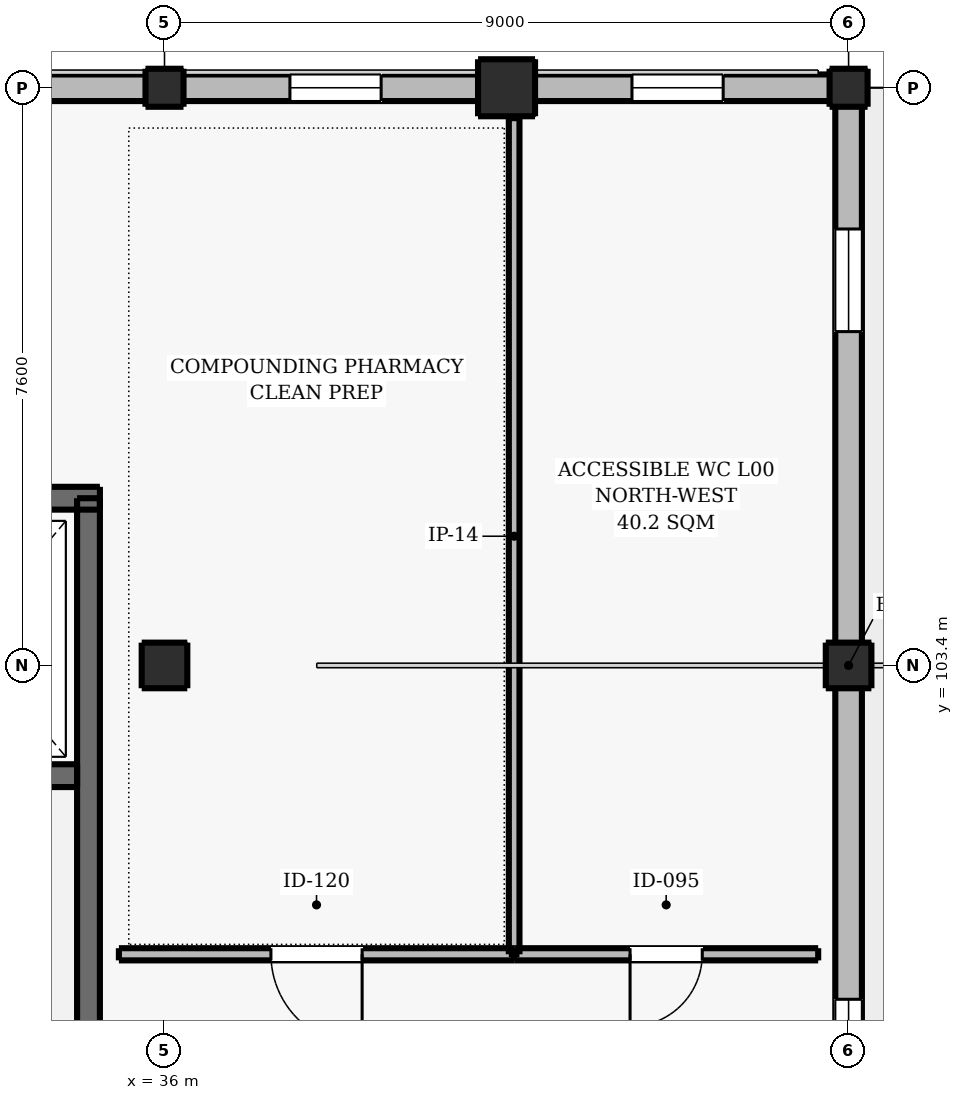
"""IFC4 building model, lengths in metres.
Left out: names, types, materials, properties, quantities, classifications, styles, units other than length and angle.
Written with IfcOpenShell. Run it as: python <this file> out.ifc"""

import sys

from ifc_helpers import new_model, si_unit, direction, frame, frame_2d, origin, origin_2d, place, context, subcontext, project, spatial, rectangle, circle, extrude, element, fill, save


model = new_model("IFC4")
c1 = context("Model", 3, precision=1e-05, world=origin(), true_north=direction((0.0, 1.0)))
c2 = subcontext(c1, "Body", "Model", "MODEL_VIEW")
j1 = project(units=[si_unit("LENGTHUNIT", "METRE"), si_unit("PLANEANGLEUNIT", "RADIAN")], contexts=[c1])
p1 = place(None, origin())
s1 = spatial("IfcSite", under=j1, at=p1, CompositionType="ELEMENT")
p2 = place(p1, origin())
s2 = spatial("IfcBuilding", under=s1, at=p2, CompositionType="ELEMENT")
p3 = place(p2, origin())
s3 = spatial("IfcBuildingStorey", under=s2, at=p3, CompositionType="ELEMENT", Elevation=0.0)
p4 = place(p3, frame((36.0, 103.4, 0.0), z_axis=(0.0, 0.0, 1.0), x_axis=(1.0, 0.0, 0.0)))
e1 = element("IfcColumn", 1, at=p4, inside=s3, PredefinedType="COLUMN", context=c2, shape_type="SweptSolid", body=[
    extrude(rectangle(XDim=0.6, YDim=0.6, at=origin_2d()), origin(), (0.0, 0.0, 1.0), 5.1),
])
p5 = place(p3, frame((36.0, 111.0, 0.0), z_axis=(0.0, 0.0, 1.0), x_axis=(1.0, 0.0, 0.0)))
e2 = element("IfcColumn", 2, at=p5, inside=s3, PredefinedType="COLUMN", context=c2, shape_type="SweptSolid", body=[
    extrude(circle(Radius=0.35, at=origin_2d()), origin(), (0.0, 0.0, 1.0), 5.1),
])
p6 = place(p3, frame((40.5, 111.0, 0.0), z_axis=(0.0, 0.0, 1.0), x_axis=(1.0, 0.0, 0.0)))
e3 = element("IfcColumn", 3, at=p6, inside=s3, PredefinedType="PILASTER", context=c2, shape_type="SweptSolid", body=[
    extrude(rectangle(XDim=0.75, YDim=0.75, at=origin_2d()), origin(), (0.0, 0.0, 1.0), 5.1),
])
p7 = place(p3, frame((45.0, 103.4, 0.0), z_axis=(0.0, 0.0, 1.0), x_axis=(1.0, 0.0, 0.0)))
e4 = element("IfcColumn", 4, at=p7, inside=s3, PredefinedType="COLUMN", context=c2, shape_type="SweptSolid", body=[
    extrude(rectangle(XDim=0.6, YDim=0.6, at=origin_2d()), origin(), (0.0, 0.0, 1.0), 5.1),
])
p8 = place(p3, frame((45.0, 111.0, 0.0), z_axis=(0.0, 0.0, 1.0), x_axis=(1.0, 0.0, 0.0)))
e5 = element("IfcColumn", 5, at=p8, inside=s3, PredefinedType="COLUMN", context=c2, shape_type="SweptSolid", body=[
    extrude(circle(Radius=0.35, at=origin_2d()), origin(), (0.0, 0.0, 1.0), 5.1),
])
p9 = place(p3, frame((27.25, 105.6, 0.0), z_axis=(0.0, 0.0, 1.0), x_axis=(1.0, 0.0, 0.0)))
e6 = element("IfcWall", 6, at=p9, inside=s3, PredefinedType="SHEAR", context=c2, shape_type="SweptSolid", body=[
    extrude(rectangle(XDim=7.9, YDim=0.3, at=frame_2d((3.95, 0.0))), origin(), (0.0, 0.0, 1.0), 5.1),
])
p10 = place(p3, frame((35.0, 98.4, 0.0), z_axis=(0.0, 0.0, 1.0), x_axis=(0.0, 1.0, 0.0)))
e7 = element("IfcWall", 7, at=p10, inside=s3, PredefinedType="SHEAR", context=c2, shape_type="SweptSolid", body=[
    extrude(rectangle(XDim=7.2, YDim=0.3, at=frame_2d((3.6, 0.0))), origin(), (0.0, 0.0, 1.0), 5.1),
])
p11 = place(p3, frame((27.55, 101.95, 0.0), z_axis=(0.0, 0.0, 1.0), x_axis=(1.0, 0.0, 0.0)))
e8 = element("IfcWall", 8, at=p11, inside=s3, PredefinedType="SHEAR", context=c2, shape_type="SweptSolid", body=[
    extrude(rectangle(XDim=7.3, YDim=0.3, at=frame_2d((3.65, 0.0))), origin(), (0.0, 0.0, 1.0), 5.1),
])
p12 = place(p3, frame((0.0, 111.0, 0.0), z_axis=(0.0, 0.0, 1.0), x_axis=(1.0, 0.0, 0.0)))
e9 = element("IfcWall", 9, at=p12, inside=s3, PredefinedType="SOLIDWALL", context=c2, shape_type="SweptSolid", body=[
    extrude(rectangle(XDim=45.0, YDim=0.35, at=frame_2d((22.5, 0.0))), origin(), (0.0, 0.0, 1.0), 4.01),
])
p13 = place(p12, frame((23.45, 0.0, 0.0)))
e10 = element("IfcOpeningElement", 10, at=p13, cuts=e9, PredefinedType="OPENING", context=c2, shape_type="SweptSolid", body=[
    extrude(rectangle(XDim=2.6, YDim=2.6, at=frame_2d((1.3, 1.3))), frame((0.0, 0.185, 0.0), z_axis=(0.0, -1.0, 0.0), x_axis=(1.0, 0.0, 0.0)), (0.0, 0.0, 1.0), 0.37),
])
p14 = place(p12, frame((30.2, 0.0, 0.0)))
e11 = element("IfcOpeningElement", 11, at=p14, cuts=e9, PredefinedType="OPENING", context=c2, shape_type="SweptSolid", body=[
    extrude(rectangle(XDim=2.6, YDim=2.6, at=frame_2d((1.3, 1.3))), frame((0.0, 0.185, 0.0), z_axis=(0.0, -1.0, 0.0), x_axis=(1.0, 0.0, 0.0)), (0.0, 0.0, 1.0), 0.37),
])
p15 = place(p12, frame((1.65, 0.0, 1.05)))
e12 = element("IfcOpeningElement", 12, at=p15, cuts=e9, PredefinedType="OPENING", context=c2, shape_type="SweptSolid", body=[
    extrude(rectangle(XDim=1.2, YDim=1.5, at=frame_2d((0.6, 0.75))), frame((0.0, 0.185, 0.0), z_axis=(0.0, -1.0, 0.0), x_axis=(1.0, 0.0, 0.0)), (0.0, 0.0, 1.0), 0.37),
])
p16 = place(p12, frame((6.15, 0.0, 1.05)))
e13 = element("IfcOpeningElement", 13, at=p16, cuts=e9, PredefinedType="OPENING", context=c2, shape_type="SweptSolid", body=[
    extrude(rectangle(XDim=1.2, YDim=1.5, at=frame_2d((0.6, 0.75))), frame((0.0, 0.185, 0.0), z_axis=(0.0, -1.0, 0.0), x_axis=(1.0, 0.0, 0.0)), (0.0, 0.0, 1.0), 0.37),
])
p17 = place(p12, frame((10.65, 0.0, 1.05)))
e14 = element("IfcOpeningElement", 14, at=p17, cuts=e9, PredefinedType="OPENING", context=c2, shape_type="SweptSolid", body=[
    extrude(rectangle(XDim=1.2, YDim=1.5, at=frame_2d((0.6, 0.75))), frame((0.0, 0.185, 0.0), z_axis=(0.0, -1.0, 0.0), x_axis=(1.0, 0.0, 0.0)), (0.0, 0.0, 1.0), 0.37),
])
p18 = place(p12, frame((15.15, 0.0, 1.05)))
e15 = element("IfcOpeningElement", 15, at=p18, cuts=e9, PredefinedType="OPENING", context=c2, shape_type="SweptSolid", body=[
    extrude(rectangle(XDim=1.2, YDim=1.5, at=frame_2d((0.6, 0.75))), frame((0.0, 0.185, 0.0), z_axis=(0.0, -1.0, 0.0), x_axis=(1.0, 0.0, 0.0)), (0.0, 0.0, 1.0), 0.37),
])
p19 = place(p12, frame((19.65, 0.0, 1.05)))
e16 = element("IfcOpeningElement", 16, at=p19, cuts=e9, PredefinedType="OPENING", context=c2, shape_type="SweptSolid", body=[
    extrude(rectangle(XDim=1.2, YDim=1.5, at=frame_2d((0.6, 0.75))), frame((0.0, 0.185, 0.0), z_axis=(0.0, -1.0, 0.0), x_axis=(1.0, 0.0, 0.0)), (0.0, 0.0, 1.0), 0.37),
])
p20 = place(p12, frame((37.65, 0.0, 1.05)))
e17 = element("IfcOpeningElement", 17, at=p20, cuts=e9, PredefinedType="OPENING", context=c2, shape_type="SweptSolid", body=[
    extrude(rectangle(XDim=1.2, YDim=1.5, at=frame_2d((0.6, 0.75))), frame((0.0, 0.185, 0.0), z_axis=(0.0, -1.0, 0.0), x_axis=(1.0, 0.0, 0.0)), (0.0, 0.0, 1.0), 0.37),
])
p21 = place(p12, frame((42.15, 0.0, 1.05)))
e18 = element("IfcOpeningElement", 18, at=p21, cuts=e9, PredefinedType="OPENING", context=c2, shape_type="SweptSolid", body=[
    extrude(rectangle(XDim=1.2, YDim=1.5, at=frame_2d((0.6, 0.75))), frame((0.0, 0.185, 0.0), z_axis=(0.0, -1.0, 0.0), x_axis=(1.0, 0.0, 0.0)), (0.0, 0.0, 1.0), 0.37),
])
p22 = place(p3, frame((45.0, 111.0, 0.0), z_axis=(0.0, 0.0, 1.0), x_axis=(0.0, -1.0, 0.0)))
e19 = element("IfcWall", 19, at=p22, inside=s3, PredefinedType="SOLIDWALL", context=c2, shape_type="SweptSolid", body=[
    extrude(rectangle(XDim=15.2, YDim=0.35, at=frame_2d((7.6, 0.0))), origin(), (0.0, 0.0, 1.0), 4.16),
])
p23 = place(p22, frame((1.858, 0.0, 1.05)))
e20 = element("IfcOpeningElement", 20, at=p23, cuts=e19, PredefinedType="OPENING", context=c2, shape_type="SweptSolid", body=[
    extrude(rectangle(XDim=1.35, YDim=1.5, at=frame_2d((0.675, 0.75))), frame((0.0, 0.185, 0.0), z_axis=(0.0, -1.0, 0.0), x_axis=(1.0, 0.0, 0.0)), (0.0, 0.0, 1.0), 0.37),
])
p24 = place(p22, frame((11.992, 0.0, 1.05)))
e21 = element("IfcOpeningElement", 21, at=p24, cuts=e19, PredefinedType="OPENING", context=c2, shape_type="SweptSolid", body=[
    extrude(rectangle(XDim=1.35, YDim=1.5, at=frame_2d((0.675, 0.75))), frame((0.0, 0.185, 0.0), z_axis=(0.0, -1.0, 0.0), x_axis=(1.0, 0.0, 0.0)), (0.0, 0.0, 1.0), 0.37),
])
p25 = place(p3, frame((35.4, 99.6, 0.0), z_axis=(0.0, 0.0, 1.0), x_axis=(1.0, 0.0, 0.0)))
e22 = element("IfcWall", 22, at=p25, inside=s3, PredefinedType="PARTITIONING", context=c2, shape_type="SweptSolid", body=[
    extrude(rectangle(XDim=5.2, YDim=0.16, at=frame_2d((2.6, 0.0))), origin(), (0.0, 0.0, 1.0), 4.82),
])
p26 = place(p25, frame((2.0, 0.0, 0.0)))
e23 = element("IfcOpeningElement", 23, at=p26, cuts=e22, PredefinedType="OPENING", context=c2, shape_type="SweptSolid", body=[
    extrude(rectangle(XDim=1.2, YDim=2.2, at=frame_2d((0.6, 1.1))), frame((0.0, 0.09, 0.0), z_axis=(0.0, -1.0, 0.0), x_axis=(1.0, 0.0, 0.0)), (0.0, 0.0, 1.0), 0.18),
])
p27 = place(p3, frame((40.6, 99.6, 0.0), z_axis=(0.0, 0.0, 1.0), x_axis=(0.0, 1.0, 0.0)))
e24 = element("IfcWall", 24, at=p27, inside=s3, PredefinedType="PARTITIONING", context=c2, shape_type="SweptSolid", body=[
    extrude(rectangle(XDim=11.0, YDim=0.14, at=frame_2d((5.5, 0.0))), origin(), (0.0, 0.0, 1.0), 4.82),
])
p28 = place(p3, frame((40.6, 99.6, 0.0), z_axis=(0.0, 0.0, 1.0), x_axis=(1.0, 0.0, 0.0)))
e25 = element("IfcWall", 25, at=p28, inside=s3, PredefinedType="PARTITIONING", context=c2, shape_type="SweptSolid", body=[
    extrude(rectangle(XDim=4.0, YDim=0.16, at=frame_2d((2.0, 0.0))), origin(), (0.0, 0.0, 1.0), 4.82),
])
p29 = place(p28, frame((1.525, 0.0, 0.0)))
e26 = element("IfcOpeningElement", 26, at=p29, cuts=e25, PredefinedType="OPENING", context=c2, shape_type="SweptSolid", body=[
    extrude(rectangle(XDim=0.95, YDim=2.1, at=frame_2d((0.475, 1.05))), frame((0.0, 0.09, 0.0), z_axis=(0.0, -1.0, 0.0), x_axis=(1.0, 0.0, 0.0)), (0.0, 0.0, 1.0), 0.18),
])
p30 = place(p20, origin())
e27 = element("IfcWindow", 27, at=p30, inside=s3, PartitioningType="SINGLE_PANEL", PredefinedType="WINDOW", context=c2, shape_type="SweptSolid", body=[
    extrude(rectangle(XDim=1.2, YDim=1.5, at=frame_2d((0.6, 0.75))), frame((0.0, 0.03, 0.0), z_axis=(0.0, -1.0, 0.0), x_axis=(1.0, 0.0, 0.0)), (0.0, 0.0, 1.0), 0.06),
])
fill(e17, e27)
p31 = place(p21, origin())
e28 = element("IfcWindow", 28, at=p31, inside=s3, PartitioningType="SINGLE_PANEL", PredefinedType="WINDOW", context=c2, shape_type="SweptSolid", body=[
    extrude(rectangle(XDim=1.2, YDim=1.5, at=frame_2d((0.6, 0.75))), frame((0.0, 0.03, 0.0), z_axis=(0.0, -1.0, 0.0), x_axis=(1.0, 0.0, 0.0)), (0.0, 0.0, 1.0), 0.06),
])
fill(e18, e28)
p32 = place(p23, origin())
e29 = element("IfcWindow", 29, at=p32, inside=s3, PartitioningType="SINGLE_PANEL", PredefinedType="WINDOW", context=c2, shape_type="SweptSolid", body=[
    extrude(rectangle(XDim=1.35, YDim=1.5, at=frame_2d((0.675, 0.75))), frame((0.0, 0.03, 0.0), z_axis=(0.0, -1.0, 0.0), x_axis=(1.0, 0.0, 0.0)), (0.0, 0.0, 1.0), 0.06),
])
fill(e20, e29)
p33 = place(p24, origin())
e30 = element("IfcWindow", 30, at=p33, inside=s3, PartitioningType="SINGLE_PANEL", PredefinedType="WINDOW", context=c2, shape_type="SweptSolid", body=[
    extrude(rectangle(XDim=1.35, YDim=1.5, at=frame_2d((0.675, 0.75))), frame((0.0, 0.03, 0.0), z_axis=(0.0, -1.0, 0.0), x_axis=(1.0, 0.0, 0.0)), (0.0, 0.0, 1.0), 0.06),
])
fill(e21, e30)
p34 = place(p26, frame((1.2, 0.0, 0.0), z_axis=(0.0, 0.0, 1.0), x_axis=(-1.0, 0.0, 0.0)))
e31 = element("IfcDoor", 31, at=p34, inside=s3, OperationType="SINGLE_SWING_RIGHT", PredefinedType="DOOR", context=c2, shape_type="SweptSolid", body=[
    extrude(rectangle(XDim=1.2, YDim=2.2, at=frame_2d((0.6, 1.1))), frame((0.0, 0.025, 0.0), z_axis=(0.0, -1.0, 0.0), x_axis=(1.0, 0.0, 0.0)), (0.0, 0.0, 1.0), 0.05),
])
fill(e23, e31)
p35 = place(p29, frame((0.95, 0.0, 0.0), z_axis=(0.0, 0.0, 1.0), x_axis=(-1.0, 0.0, 0.0)))
e32 = element("IfcDoor", 32, at=p35, inside=s3, OperationType="SINGLE_SWING_LEFT", PredefinedType="DOOR", context=c2, shape_type="SweptSolid", body=[
    extrude(rectangle(XDim=0.95, YDim=2.1, at=frame_2d((0.475, 1.05))), frame((0.0, 0.025, 0.0), z_axis=(0.0, -1.0, 0.0), x_axis=(1.0, 0.0, 0.0)), (0.0, 0.0, 1.0), 0.05),
])
fill(e26, e32)
save(model, sys.argv[1])
